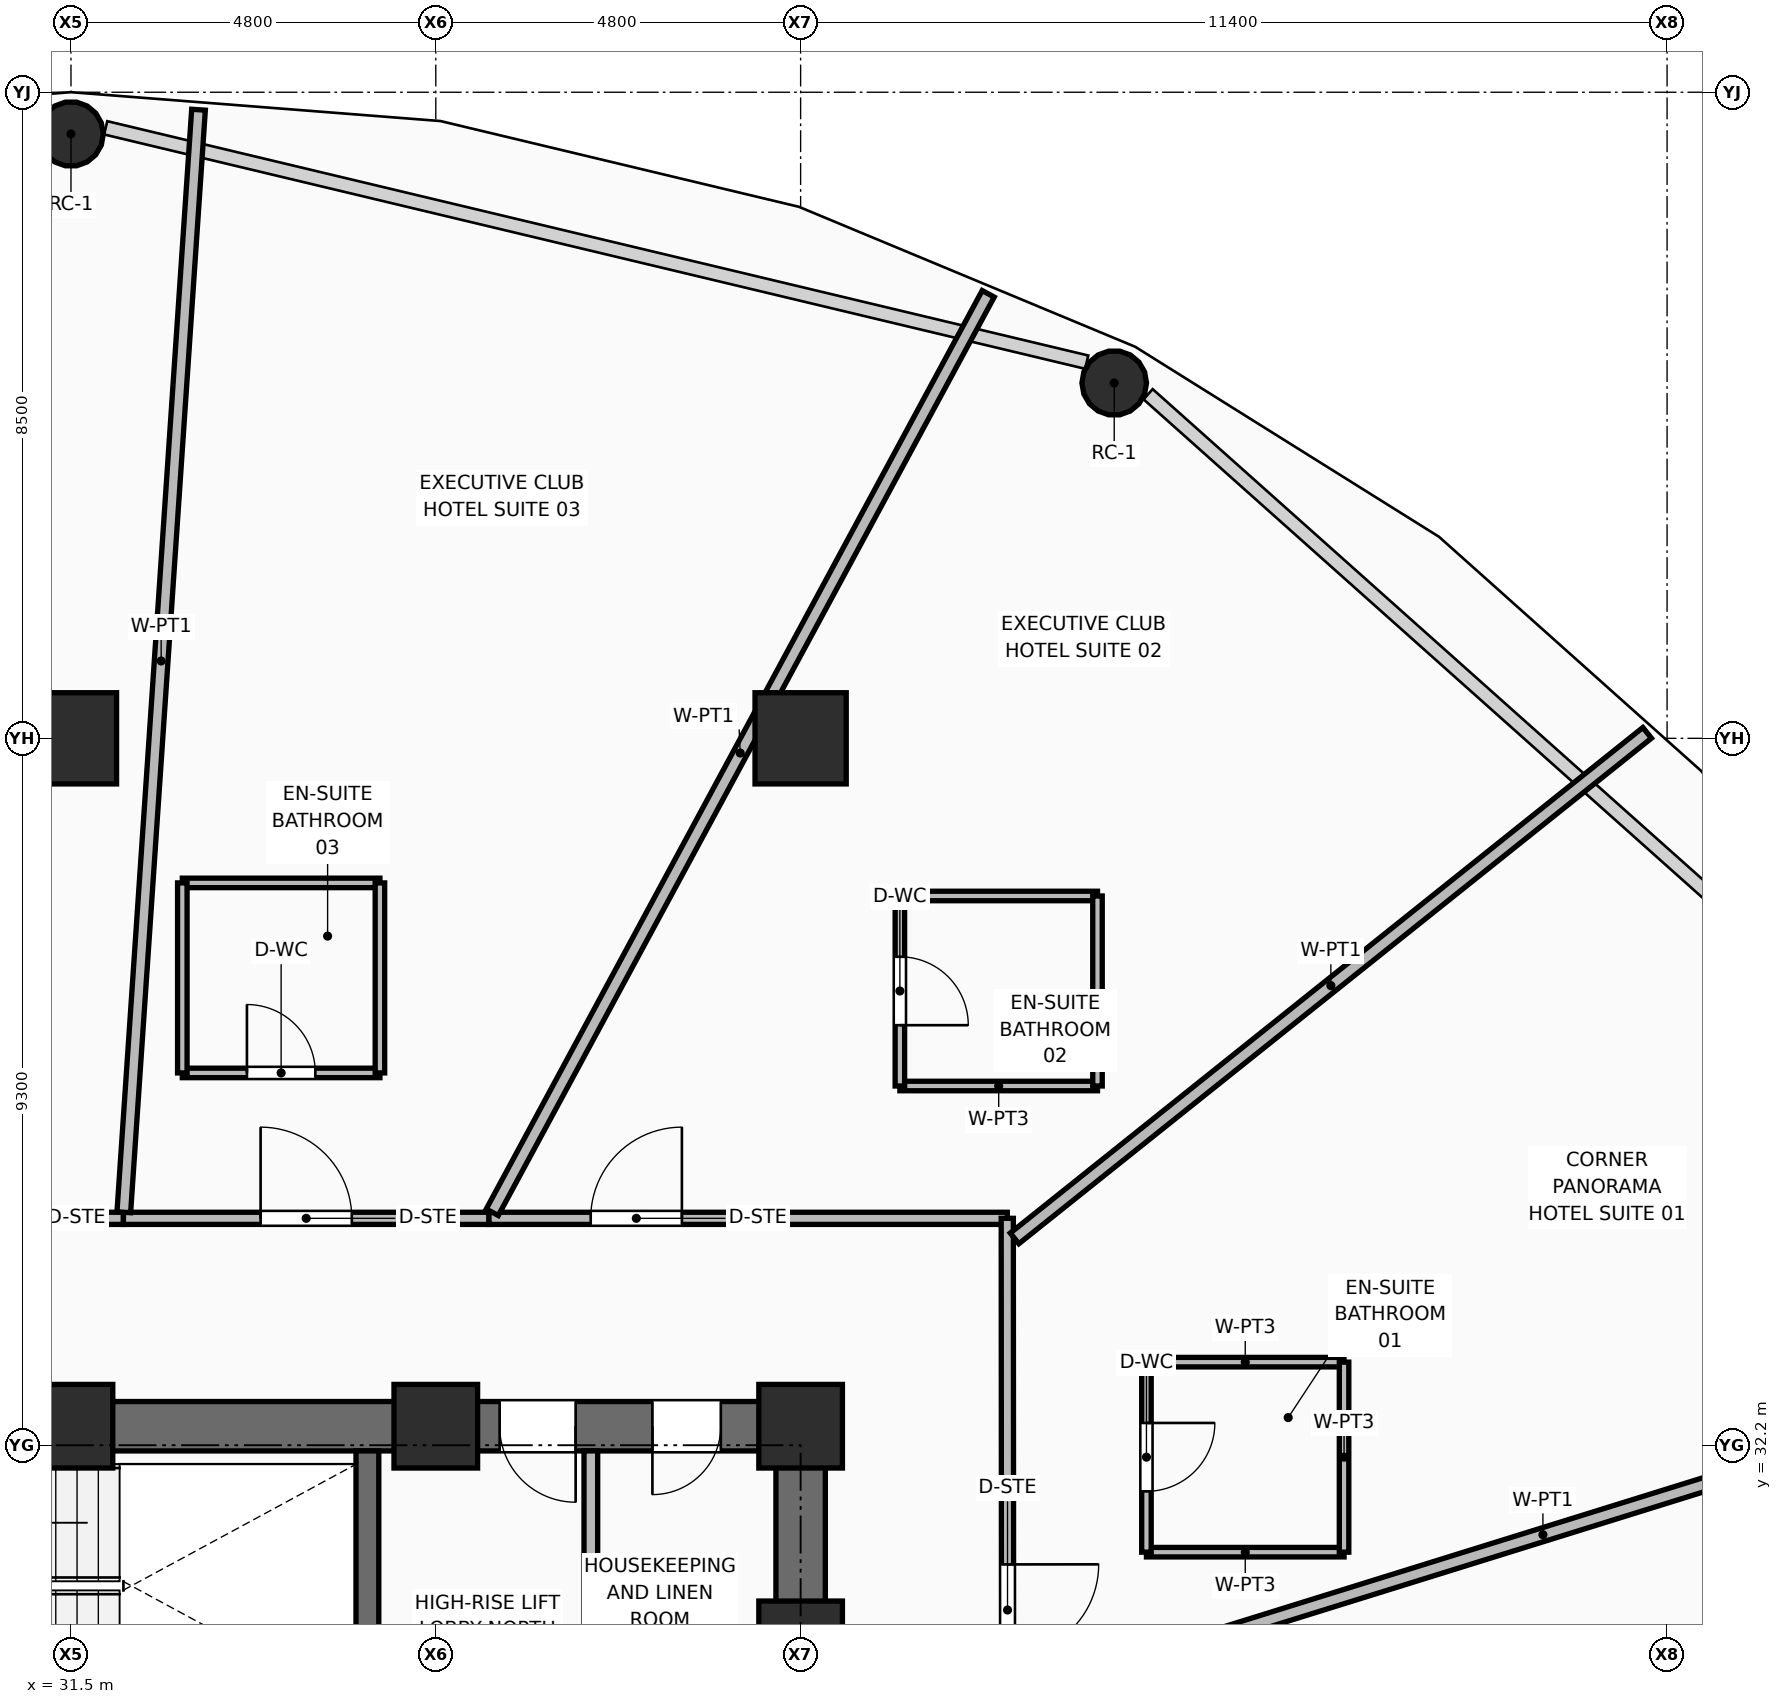
"""IFC4 building model, lengths in metres.
Left out: names, types, materials, properties, quantities, classifications, styles, units other than length and angle.
Written with IfcOpenShell. Run it as: python <this file> out.ifc"""

import sys

from ifc_helpers import new_model, si_unit, direction, frame, frame_2d, origin, origin_2d, place, context, subcontext, project, spatial, rectangle, hollow_rectangle, hollow_circle, extrude, element, fill, save


model = new_model("IFC4")
c1 = context("Model", 3, precision=1e-05, world=origin(), true_north=direction((0.0, 1.0)))
c2 = subcontext(c1, "Body", "Model", "MODEL_VIEW")
j1 = project(units=[si_unit("LENGTHUNIT", "METRE"), si_unit("PLANEANGLEUNIT", "RADIAN")], contexts=[c1])
p1 = place(None, origin())
s1 = spatial("IfcSite", under=j1, at=p1, CompositionType="ELEMENT")
p2 = place(p1, origin())
s2 = spatial("IfcBuilding", under=s1, at=p2, CompositionType="ELEMENT")
p3 = place(p2, frame((0.0, 0.0, 57.0)))
s3 = spatial("IfcBuildingStorey", under=s2, at=p3, CompositionType="ELEMENT", Elevation=57.0)
for number, where, z_axis, x_axis in (
    (1, (41.1, 29.6, 0.0), (0.0, 0.0, 1.0), (1.0, 0.0, 0.0)),
    (2, (31.5, 32.45, 0.0), (0.0, 0.0, 1.0), (1.0, 0.0, 0.0)),
    (3, (36.3, 32.45, 0.0), (0.0, 0.0, 1.0), (1.0, 0.0, 0.0)),
    (4, (41.1, 32.45, 0.0), (0.0, 0.0, 1.0), (1.0, 0.0, 0.0)),
):
    element("IfcColumn", number, at=place(p3, frame(where, z_axis=z_axis, x_axis=x_axis)), inside=s3, PredefinedType="COLUMN", context=c2, shape_type="SweptSolid", body=[
        extrude(rectangle(XDim=1.1, YDim=1.1, at=origin_2d()), origin(), (0.0, 0.0, 1.0), 3.75),
    ])
for number, where, z_axis, x_axis in (
    (5, (31.5, 41.5, 0.0), (0.0, 0.0, 1.0), (1.0, 0.0, 0.0)),
    (6, (41.1, 41.5, 0.0), (0.0, 0.0, 1.0), (1.0, 0.0, 0.0)),
):
    element("IfcColumn", number, at=place(p3, frame(where, z_axis=z_axis, x_axis=x_axis)), inside=s3, PredefinedType="COLUMN", context=c2, shape_type="SweptSolid", body=[
        extrude(hollow_rectangle(XDim=1.2, YDim=1.2, WallThickness=0.045, at=origin_2d()), origin(), (0.0, 0.0, 1.0), 3.75),
    ])
for number, where, z_axis, x_axis in (
    (7, (45.226, 46.175, 0.0), (0.0, 0.0, 1.0), (1.0, 0.0, 0.0)),
    (8, (31.5, 49.451, 0.0), (0.0, 0.0, 1.0), (1.0, 0.0, 0.0)),
):
    element("IfcColumn", number, at=place(p3, frame(where, z_axis=z_axis, x_axis=x_axis)), inside=s3, PredefinedType="COLUMN", context=c2, shape_type="SweptSolid", body=[
        extrude(hollow_circle(Radius=0.425, WallThickness=0.04, at=origin_2d()), origin(), (0.0, 0.0, 1.0), 3.57),
    ])
p4 = place(p3, frame((21.575, 32.45, 0.0), z_axis=(0.0, 0.0, 1.0), x_axis=(1.0, 0.0, 0.0)))
e9 = element("IfcWall", 9, at=p4, inside=s3, PredefinedType="SHEAR", context=c2, shape_type="SweptSolid", body=[
    extrude(rectangle(XDim=19.85, YDim=0.65, at=frame_2d((9.925, 0.0))), origin(), (0.0, 0.0, 1.0), 3.57),
])
p5 = place(p4, frame((2.175, 0.0, 0.0)))
e10 = element("IfcOpeningElement", 10, at=p5, cuts=e9, PredefinedType="OPENING", context=c2, shape_type="SweptSolid", body=[
    extrude(rectangle(XDim=1.1, YDim=2.1, at=frame_2d((0.55, 1.05))), frame((0.0, 0.335, 0.0), z_axis=(0.0, -1.0, 0.0), x_axis=(1.0, 0.0, 0.0)), (0.0, 0.0, 1.0), 0.67),
])
p6 = place(p4, frame((15.565, 0.0, 0.0)))
e11 = element("IfcOpeningElement", 11, at=p6, cuts=e9, PredefinedType="OPENING", context=c2, shape_type="SweptSolid", body=[
    extrude(rectangle(XDim=1.0, YDim=2.1, at=frame_2d((0.5, 1.05))), frame((0.0, 0.335, 0.0), z_axis=(0.0, -1.0, 0.0), x_axis=(1.0, 0.0, 0.0)), (0.0, 0.0, 1.0), 0.67),
])
p7 = place(p4, frame((17.575, 0.0, 0.0)))
e12 = element("IfcOpeningElement", 12, at=p7, cuts=e9, PredefinedType="OPENING", context=c2, shape_type="SweptSolid", body=[
    extrude(rectangle(XDim=0.9, YDim=2.1, at=frame_2d((0.45, 1.05))), frame((0.0, 0.335, 0.0), z_axis=(0.0, -1.0, 0.0), x_axis=(1.0, 0.0, 0.0)), (0.0, 0.0, 1.0), 0.67),
])
p8 = place(p3, frame((41.1, 18.125, 0.0), z_axis=(0.0, 0.0, 1.0), x_axis=(0.0, 1.0, 0.0)))
e13 = element("IfcWall", 13, at=p8, inside=s3, PredefinedType="SHEAR", context=c2, shape_type="SweptSolid", body=[
    extrude(rectangle(XDim=14.0, YDim=0.65, at=frame_2d((7.0, 0.0))), origin(), (0.0, 0.0, 1.0), 3.57),
])
p9 = place(p8, frame((3.335, 0.0, 0.0)))
e14 = element("IfcOpeningElement", 14, at=p9, cuts=e13, PredefinedType="OPENING", context=c2, shape_type="SweptSolid", body=[
    extrude(rectangle(XDim=1.05, YDim=2.1, at=frame_2d((0.525, 1.05))), frame((0.0, 0.335, 0.0), z_axis=(0.0, -1.0, 0.0), x_axis=(1.0, 0.0, 0.0)), (0.0, 0.0, 1.0), 0.67),
])
p10 = place(p3, frame((35.4, 28.75, 0.0), z_axis=(0.0, 0.0, 1.0), x_axis=(0.0, 1.0, 0.0)))
e15 = element("IfcWall", 15, at=p10, inside=s3, PredefinedType="SHEAR", context=c2, shape_type="SweptSolid", body=[
    extrude(rectangle(XDim=3.375, YDim=0.3, at=frame_2d((1.688, 0.0))), origin(), (0.0, 0.0, 1.0), 3.57),
])
p11 = place(p3, frame((38.34, 28.62, 0.0), z_axis=(0.0, 0.0, 1.0), x_axis=(0.0, 1.0, 0.0)))
e16 = element("IfcWall", 16, at=p11, inside=s3, PredefinedType="PARTITIONING", context=c2, shape_type="SweptSolid", body=[
    extrude(rectangle(XDim=3.505, YDim=0.18, at=frame_2d((1.752, 0.0))), origin(), (0.0, 0.0, 1.0), 3.55),
])
p12 = place(p3, frame((27.617, 35.185, 0.0), z_axis=(0.0, 0.0, 1.0), x_axis=(1.0, 0.0, 0.0)))
e17 = element("IfcWall", 17, at=p12, inside=s3, PredefinedType="PARTITIONING", context=c2, shape_type="SweptSolid", body=[
    extrude(rectangle(XDim=4.573, YDim=0.16, at=frame_2d((2.287, 0.0))), origin(), (0.0, 0.0, 1.0), 2.928),
])
p13 = place(p12, frame((1.759, 0.0, 0.0)))
e18 = element("IfcOpeningElement", 18, at=p13, cuts=e17, PredefinedType="OPENING", context=c2, shape_type="SweptSolid", body=[
    extrude(rectangle(XDim=1.2, YDim=2.1, at=frame_2d((0.6, 1.05))), frame((0.0, 0.09, 0.0), z_axis=(0.0, -1.0, 0.0), x_axis=(1.0, 0.0, 0.0)), (0.0, 0.0, 1.0), 0.18),
])
p14 = place(p3, frame((32.19, 35.185, 0.0), z_axis=(0.0, 0.0, 1.0), x_axis=(1.0, 0.0, 0.0)))
e19 = element("IfcWall", 19, at=p14, inside=s3, PredefinedType="PARTITIONING", context=c2, shape_type="SweptSolid", body=[
    extrude(rectangle(XDim=4.81, YDim=0.16, at=frame_2d((2.405, 0.0))), origin(), (0.0, 0.0, 1.0), 3.55),
])
p15 = place(p14, frame((1.805, 0.0, 0.0)))
e20 = element("IfcOpeningElement", 20, at=p15, cuts=e19, PredefinedType="OPENING", context=c2, shape_type="SweptSolid", body=[
    extrude(rectangle(XDim=1.2, YDim=2.1, at=frame_2d((0.6, 1.05))), frame((0.0, 0.09, 0.0), z_axis=(0.0, -1.0, 0.0), x_axis=(1.0, 0.0, 0.0)), (0.0, 0.0, 1.0), 0.18),
])
p16 = place(p3, frame((37.0, 35.185, 0.0), z_axis=(0.0, 0.0, 1.0), x_axis=(1.0, 0.0, 0.0)))
e21 = element("IfcWall", 21, at=p16, inside=s3, PredefinedType="PARTITIONING", context=c2, shape_type="SweptSolid", body=[
    extrude(rectangle(XDim=6.819, YDim=0.16, at=frame_2d((3.41, 0.0))), origin(), (0.0, 0.0, 1.0), 2.928),
])
p17 = place(p16, frame((1.338, 0.0, 0.0)))
e22 = element("IfcOpeningElement", 22, at=p17, cuts=e21, PredefinedType="OPENING", context=c2, shape_type="SweptSolid", body=[
    extrude(rectangle(XDim=1.2, YDim=2.1, at=frame_2d((0.6, 1.05))), frame((0.0, 0.09, 0.0), z_axis=(0.0, -1.0, 0.0), x_axis=(1.0, 0.0, 0.0)), (0.0, 0.0, 1.0), 0.18),
])
p18 = place(p3, frame((43.819, 35.185, 0.0), z_axis=(0.0, 0.0, 1.0), x_axis=(0.000614958758, -0.999999810913, 0.0)))
e23 = element("IfcWall", 23, at=p18, inside=s3, PredefinedType="PARTITIONING", context=c2, shape_type="SweptSolid", body=[
    extrude(rectangle(XDim=6.352, YDim=0.16, at=frame_2d((3.176, 0.0))), origin(), (0.0, 0.0, 1.0), 2.928),
])
p19 = place(p18, frame((4.553, 0.0, 0.0)))
e24 = element("IfcOpeningElement", 24, at=p19, cuts=e23, PredefinedType="OPENING", context=c2, shape_type="SweptSolid", body=[
    extrude(rectangle(XDim=1.2, YDim=2.1, at=frame_2d((0.6, 1.05))), frame((0.0, 0.09, 0.0), z_axis=(0.0, -1.0, 0.0), x_axis=(1.0, 0.0, 0.0)), (0.0, 0.0, 1.0), 0.18),
])
p20 = place(p3, frame((43.915, 28.861, 0.0), z_axis=(0.0, 0.0, 1.0), x_axis=(0.954884570259, 0.296977200271, 0.0)))
e25 = element("IfcWall", 25, at=p20, inside=s3, PredefinedType="PARTITIONING", context=c2, shape_type="SweptSolid", body=[
    extrude(rectangle(XDim=14.56, YDim=0.18, at=frame_2d((7.28, 0.0))), origin(), (0.0, 0.0, 1.0), 2.775),
])
p21 = place(p3, frame((43.915, 34.921, 0.0), z_axis=(0.0, 0.0, 1.0), x_axis=(0.781201807071, 0.624278572938, 0.0)))
e26 = element("IfcWall", 26, at=p21, inside=s3, PredefinedType="PARTITIONING", context=c2, shape_type="SweptSolid", body=[
    extrude(rectangle(XDim=10.654, YDim=0.18, at=frame_2d((5.327, 0.0))), origin(), (0.0, 0.0, 1.0), 2.775),
])
p22 = place(p3, frame((37.043, 35.265, 0.0), z_axis=(0.0, 0.0, 1.0), x_axis=(0.475167084094, 0.879895585961, 0.0)))
e27 = element("IfcWall", 27, at=p22, inside=s3, PredefinedType="PARTITIONING", context=c2, shape_type="SweptSolid", body=[
    extrude(rectangle(XDim=13.732, YDim=0.18, at=frame_2d((6.866, 0.0))), origin(), (0.0, 0.0, 1.0), 2.775),
])
p23 = place(p3, frame((32.195, 35.265, 0.0), z_axis=(0.0, 0.0, 1.0), x_axis=(0.06760790372, 0.997711968132, 0.0)))
e28 = element("IfcWall", 28, at=p23, inside=s3, PredefinedType="PARTITIONING", context=c2, shape_type="SweptSolid", body=[
    extrude(rectangle(XDim=14.538, YDim=0.18, at=frame_2d((7.269, 0.0))), origin(), (0.0, 0.0, 1.0), 2.775),
])
for number, where, z_axis, x_axis in (
    (29, (45.65, 30.793, 0.0), (0.0, 0.0, 1.0), (1.0, 0.0, 0.0)),
    (30, (45.65, 33.293, 0.0), (0.0, 0.0, 1.0), (1.0, 0.0, 0.0)),
):
    element("IfcWall", number, at=place(p3, frame(where, z_axis=z_axis, x_axis=x_axis)), inside=s3, PredefinedType="PARTITIONING", context=c2, shape_type="SweptSolid", body=[
        extrude(rectangle(XDim=2.6, YDim=0.125, at=frame_2d((1.3, 0.0))), origin(), (0.0, 0.0, 1.0), 3.55),
    ])
p24 = place(p3, frame((45.65, 30.793, 0.0), z_axis=(0.0, 0.0, 1.0), x_axis=(0.0, 1.0, 0.0)))
e31 = element("IfcWall", 31, at=p24, inside=s3, PredefinedType="PARTITIONING", context=c2, shape_type="SweptSolid", body=[
    extrude(rectangle(XDim=2.5, YDim=0.125, at=frame_2d((1.25, 0.0))), origin(), (0.0, 0.0, 1.0), 3.55),
])
p25 = place(p24, frame((0.8, 0.0, 0.0)))
e32 = element("IfcOpeningElement", 32, at=p25, cuts=e31, PredefinedType="OPENING", context=c2, shape_type="SweptSolid", body=[
    extrude(rectangle(XDim=0.9, YDim=2.1, at=frame_2d((0.45, 1.05))), frame((0.0, 0.073, 0.0), z_axis=(0.0, -1.0, 0.0), x_axis=(1.0, 0.0, 0.0)), (0.0, 0.0, 1.0), 0.145),
])
p26 = place(p3, frame((48.25, 30.793, 0.0), z_axis=(0.0, 0.0, 1.0), x_axis=(0.0, 1.0, 0.0)))
e33 = element("IfcWall", 33, at=p26, inside=s3, PredefinedType="PARTITIONING", context=c2, shape_type="SweptSolid", body=[
    extrude(rectangle(XDim=2.5, YDim=0.125, at=frame_2d((1.25, 0.0))), origin(), (0.0, 0.0, 1.0), 3.55),
])
for number, where, z_axis, x_axis in (
    (34, (42.406, 36.926, 0.0), (0.0, 0.0, 1.0), (1.0, 0.0, 0.0)),
    (35, (42.406, 39.426, 0.0), (0.0, 0.0, 1.0), (1.0, 0.0, 0.0)),
):
    element("IfcWall", number, at=place(p3, frame(where, z_axis=z_axis, x_axis=x_axis)), inside=s3, PredefinedType="PARTITIONING", context=c2, shape_type="SweptSolid", body=[
        extrude(rectangle(XDim=2.6, YDim=0.125, at=frame_2d((1.3, 0.0))), origin(), (0.0, 0.0, 1.0), 2.928),
    ])
p27 = place(p3, frame((42.406, 36.926, 0.0), z_axis=(0.0, 0.0, 1.0), x_axis=(0.0, 1.0, 0.0)))
e36 = element("IfcWall", 36, at=p27, inside=s3, PredefinedType="PARTITIONING", context=c2, shape_type="SweptSolid", body=[
    extrude(rectangle(XDim=2.5, YDim=0.125, at=frame_2d((1.25, 0.0))), origin(), (0.0, 0.0, 1.0), 2.928),
])
p28 = place(p27, frame((0.8, 0.0, 0.0)))
e37 = element("IfcOpeningElement", 37, at=p28, cuts=e36, PredefinedType="OPENING", context=c2, shape_type="SweptSolid", body=[
    extrude(rectangle(XDim=0.9, YDim=2.1, at=frame_2d((0.45, 1.05))), frame((0.0, 0.073, 0.0), z_axis=(0.0, -1.0, 0.0), x_axis=(1.0, 0.0, 0.0)), (0.0, 0.0, 1.0), 0.145),
])
p29 = place(p3, frame((45.006, 36.926, 0.0), z_axis=(0.0, 0.0, 1.0), x_axis=(0.0, 1.0, 0.0)))
e38 = element("IfcWall", 38, at=p29, inside=s3, PredefinedType="PARTITIONING", context=c2, shape_type="SweptSolid", body=[
    extrude(rectangle(XDim=2.5, YDim=0.125, at=frame_2d((1.25, 0.0))), origin(), (0.0, 0.0, 1.0), 3.55),
])
p30 = place(p3, frame((32.965, 37.098, 0.0), z_axis=(0.0, 0.0, 1.0), x_axis=(1.0, 0.0, 0.0)))
e39 = element("IfcWall", 39, at=p30, inside=s3, PredefinedType="PARTITIONING", context=c2, shape_type="SweptSolid", body=[
    extrude(rectangle(XDim=2.6, YDim=0.125, at=frame_2d((1.3, 0.0))), origin(), (0.0, 0.0, 1.0), 3.55),
])
p31 = place(p30, frame((0.85, 0.0, 0.0)))
e40 = element("IfcOpeningElement", 40, at=p31, cuts=e39, PredefinedType="OPENING", context=c2, shape_type="SweptSolid", body=[
    extrude(rectangle(XDim=0.9, YDim=2.1, at=frame_2d((0.45, 1.05))), frame((0.0, 0.073, 0.0), z_axis=(0.0, -1.0, 0.0), x_axis=(1.0, 0.0, 0.0)), (0.0, 0.0, 1.0), 0.145),
])
p32 = place(p3, frame((32.965, 39.598, 0.0), z_axis=(0.0, 0.0, 1.0), x_axis=(1.0, 0.0, 0.0)))
e41 = element("IfcWall", 41, at=p32, inside=s3, PredefinedType="PARTITIONING", context=c2, shape_type="SweptSolid", body=[
    extrude(rectangle(XDim=2.6, YDim=0.125, at=frame_2d((1.3, 0.0))), origin(), (0.0, 0.0, 1.0), 3.55),
])
for number, where, z_axis, x_axis in (
    (42, (32.965, 37.098, 0.0), (0.0, 0.0, 1.0), (0.0, 1.0, 0.0)),
    (43, (35.565, 37.098, 0.0), (0.0, 0.0, 1.0), (0.0, 1.0, 0.0)),
):
    element("IfcWall", number, at=place(p3, frame(where, z_axis=z_axis, x_axis=x_axis)), inside=s3, PredefinedType="PARTITIONING", context=c2, shape_type="SweptSolid", body=[
        extrude(rectangle(XDim=2.5, YDim=0.125, at=frame_2d((1.25, 0.0))), origin(), (0.0, 0.0, 1.0), 3.55),
    ])
p33 = place(p6, frame((1.0, 0.0, 0.0), z_axis=(0.0, 0.0, 1.0), x_axis=(-1.0, 0.0, 0.0)))
e44 = element("IfcDoor", 44, at=p33, inside=s3, OperationType="SINGLE_SWING_LEFT", PredefinedType="DOOR", context=c2, shape_type="SweptSolid", body=[
    extrude(rectangle(XDim=1.0, YDim=2.1, at=frame_2d((0.5, 1.05))), frame((0.0, 0.025, 0.0), z_axis=(0.0, -1.0, 0.0), x_axis=(1.0, 0.0, 0.0)), (0.0, 0.0, 1.0), 0.05),
])
fill(e11, e44)
p34 = place(p7, frame((0.9, 0.0, 0.0), z_axis=(0.0, 0.0, 1.0), x_axis=(-1.0, 0.0, 0.0)))
e45 = element("IfcDoor", 45, at=p34, inside=s3, OperationType="SINGLE_SWING_RIGHT", PredefinedType="DOOR", context=c2, shape_type="SweptSolid", body=[
    extrude(rectangle(XDim=0.9, YDim=2.1, at=frame_2d((0.45, 1.05))), frame((0.0, 0.025, 0.0), z_axis=(0.0, -1.0, 0.0), x_axis=(1.0, 0.0, 0.0)), (0.0, 0.0, 1.0), 0.05),
])
fill(e12, e45)
p35 = place(p25, frame((0.9, 0.0, 0.0), z_axis=(0.0, 0.0, 1.0), x_axis=(-1.0, 0.0, 0.0)))
e46 = element("IfcDoor", 46, at=p35, inside=s3, OperationType="SINGLE_SWING_LEFT", PredefinedType="DOOR", context=c2, shape_type="SweptSolid", body=[
    extrude(rectangle(XDim=0.9, YDim=2.1, at=frame_2d((0.45, 1.05))), frame((0.0, 0.025, 0.0), z_axis=(0.0, -1.0, 0.0), x_axis=(1.0, 0.0, 0.0)), (0.0, 0.0, 1.0), 0.05),
])
fill(e32, e46)
p36 = place(p19, origin())
e47 = element("IfcDoor", 47, at=p36, inside=s3, OperationType="SINGLE_SWING_LEFT", PredefinedType="DOOR", context=c2, shape_type="SweptSolid", body=[
    extrude(rectangle(XDim=1.2, YDim=2.1, at=frame_2d((0.6, 1.05))), frame((0.0, 0.025, 0.0), z_axis=(0.0, -1.0, 0.0), x_axis=(1.0, 0.0, 0.0)), (0.0, 0.0, 1.0), 0.05),
])
fill(e24, e47)
p37 = place(p28, frame((0.9, 0.0, 0.0), z_axis=(0.0, 0.0, 1.0), x_axis=(-1.0, 0.0, 0.0)))
e48 = element("IfcDoor", 48, at=p37, inside=s3, OperationType="SINGLE_SWING_RIGHT", PredefinedType="DOOR", context=c2, shape_type="SweptSolid", body=[
    extrude(rectangle(XDim=0.9, YDim=2.1, at=frame_2d((0.45, 1.05))), frame((0.0, 0.025, 0.0), z_axis=(0.0, -1.0, 0.0), x_axis=(1.0, 0.0, 0.0)), (0.0, 0.0, 1.0), 0.05),
])
fill(e37, e48)
p38 = place(p17, origin())
e49 = element("IfcDoor", 49, at=p38, inside=s3, OperationType="SINGLE_SWING_RIGHT", PredefinedType="DOOR", context=c2, shape_type="SweptSolid", body=[
    extrude(rectangle(XDim=1.2, YDim=2.1, at=frame_2d((0.6, 1.05))), frame((0.0, 0.025, 0.0), z_axis=(0.0, -1.0, 0.0), x_axis=(1.0, 0.0, 0.0)), (0.0, 0.0, 1.0), 0.05),
])
fill(e22, e49)
p39 = place(p31, origin())
e50 = element("IfcDoor", 50, at=p39, inside=s3, OperationType="SINGLE_SWING_LEFT", PredefinedType="DOOR", context=c2, shape_type="SweptSolid", body=[
    extrude(rectangle(XDim=0.9, YDim=2.1, at=frame_2d((0.45, 1.05))), frame((0.0, 0.025, 0.0), z_axis=(0.0, -1.0, 0.0), x_axis=(1.0, 0.0, 0.0)), (0.0, 0.0, 1.0), 0.05),
])
fill(e40, e50)
p40 = place(p15, origin())
e51 = element("IfcDoor", 51, at=p40, inside=s3, OperationType="SINGLE_SWING_LEFT", PredefinedType="DOOR", context=c2, shape_type="SweptSolid", body=[
    extrude(rectangle(XDim=1.2, YDim=2.1, at=frame_2d((0.6, 1.05))), frame((0.0, 0.025, 0.0), z_axis=(0.0, -1.0, 0.0), x_axis=(1.0, 0.0, 0.0)), (0.0, 0.0, 1.0), 0.05),
])
fill(e20, e51)
save(model, sys.argv[1])
